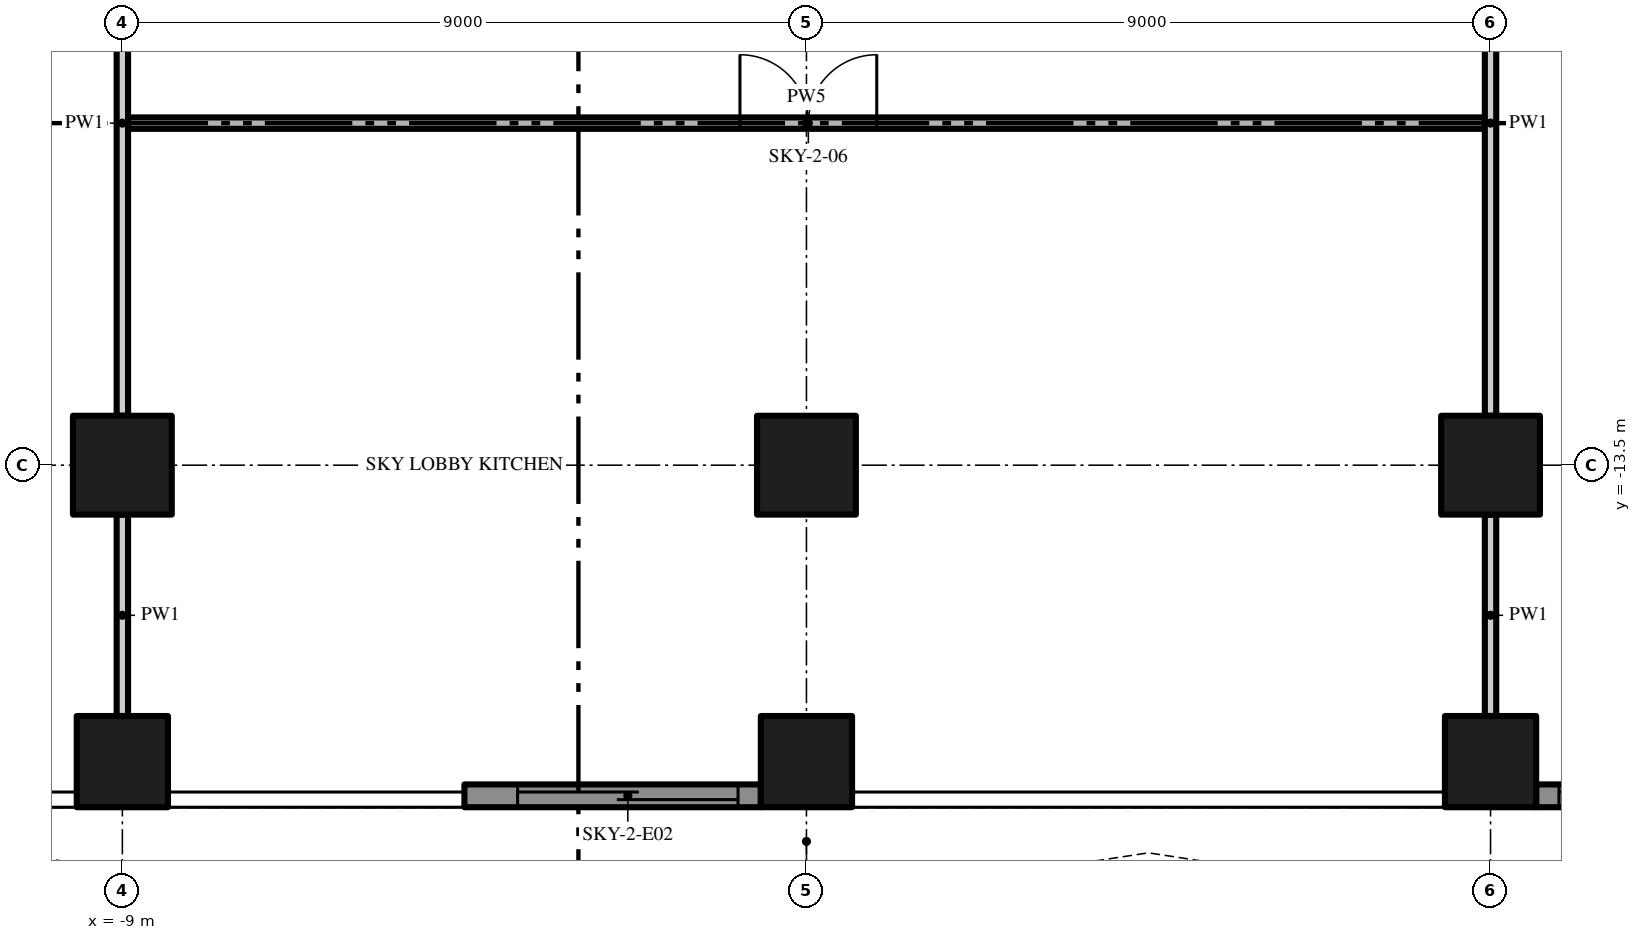
"""IFC4 building model, lengths in metres.
Left out: names, types, materials, properties, quantities, classifications, styles, units other than length and angle.
Written with IfcOpenShell. Run it as: python <this file> out.ifc"""

import sys

from ifc_helpers import new_model, si_unit, direction, frame, frame_2d, origin, origin_2d, place, context, subcontext, project, spatial, polyline, rectangle, outline, extrude, element, fill, save


model = new_model("IFC4")
c1 = context("Model", 3, precision=1e-05, world=origin(), true_north=direction((0.0, 1.0)))
c2 = subcontext(c1, "Body", "Model", "MODEL_VIEW")
j1 = project(units=[si_unit("LENGTHUNIT", "METRE"), si_unit("PLANEANGLEUNIT", "RADIAN")], contexts=[c1])
p1 = place(None, origin())
s1 = spatial("IfcSite", under=j1, at=p1, CompositionType="ELEMENT")
p2 = place(p1, origin())
s2 = spatial("IfcBuilding", under=s1, at=p2, CompositionType="ELEMENT")
p3 = place(p2, frame((0.0, 0.0, 120.0)))
s3 = spatial("IfcBuildingStorey", under=s2, at=p3, CompositionType="ELEMENT", Elevation=120.0)
p4 = place(p3, frame((-9.0, -13.5, 0.0), z_axis=(0.0, 0.0, 1.0), x_axis=(1.0, 0.0, 0.0)))
e1 = element("IfcColumn", 1, at=p4, inside=s3, PredefinedType="COLUMN", context=c2, shape_type="SweptSolid", body=[
    extrude(rectangle(XDim=1.3, YDim=1.3, at=origin_2d()), origin(), (0.0, 0.0, 1.0), 4.7),
])
p5 = place(p3, frame((-9.0, -17.4, 0.0), z_axis=(0.0, 0.0, 1.0), x_axis=(1.0, 0.0, 0.0)))
e2 = element("IfcColumn", 2, at=p5, inside=s3, PredefinedType="COLUMN", context=c2, shape_type="SweptSolid", body=[
    extrude(rectangle(XDim=1.2, YDim=1.2, at=origin_2d()), origin(), (0.0, 0.0, 1.0), 4.7),
])
p6 = place(p3, frame((0.0, -13.5, 0.0), z_axis=(0.0, 0.0, 1.0), x_axis=(1.0, 0.0, 0.0)))
e3 = element("IfcColumn", 3, at=p6, inside=s3, PredefinedType="COLUMN", context=c2, shape_type="SweptSolid", body=[
    extrude(rectangle(XDim=1.3, YDim=1.3, at=origin_2d()), origin(), (0.0, 0.0, 1.0), 4.7),
])
p7 = place(p3, frame((0.0, -17.4, 0.0), z_axis=(0.0, 0.0, 1.0), x_axis=(1.0, 0.0, 0.0)))
e4 = element("IfcColumn", 4, at=p7, inside=s3, PredefinedType="COLUMN", context=c2, shape_type="SweptSolid", body=[
    extrude(rectangle(XDim=1.2, YDim=1.2, at=origin_2d()), origin(), (0.0, 0.0, 1.0), 4.7),
])
p8 = place(p3, frame((9.0, -13.5, 0.0), z_axis=(0.0, 0.0, 1.0), x_axis=(1.0, 0.0, 0.0)))
e5 = element("IfcColumn", 5, at=p8, inside=s3, PredefinedType="COLUMN", context=c2, shape_type="SweptSolid", body=[
    extrude(rectangle(XDim=1.3, YDim=1.3, at=origin_2d()), origin(), (0.0, 0.0, 1.0), 4.7),
])
p9 = place(p3, frame((9.0, -17.4, 0.0), z_axis=(0.0, 0.0, 1.0), x_axis=(1.0, 0.0, 0.0)))
e6 = element("IfcColumn", 6, at=p9, inside=s3, PredefinedType="COLUMN", context=c2, shape_type="SweptSolid", body=[
    extrude(rectangle(XDim=1.2, YDim=1.2, at=origin_2d()), origin(), (0.0, 0.0, 1.0), 4.7),
])
p10 = place(p3, frame((-0.6, -17.85, 0.0), z_axis=(0.0, 0.0, 1.0), x_axis=(-1.0, 0.0, 0.0)))
e7 = element("IfcWall", 7, at=p10, inside=s3, PredefinedType="SOLIDWALL", context=c2, shape_type="SweptSolid", body=[
    extrude(rectangle(XDim=3.9, YDim=0.3, at=frame_2d((1.95, 0.0))), origin(), (0.0, 0.0, 1.0), 4.7),
])
p11 = place(p10, frame((0.3, 0.0, 0.0)))
e8 = element("IfcOpeningElement", 8, at=p11, cuts=e7, PredefinedType="OPENING", context=c2, shape_type="SweptSolid", body=[
    extrude(rectangle(XDim=2.9, YDim=2.4, at=frame_2d((1.45, 1.2))), frame((0.0, 0.16, 0.0), z_axis=(0.0, -1.0, 0.0), x_axis=(1.0, 0.0, 0.0)), (0.0, 0.0, 1.0), 0.32),
])
p12 = place(p3, frame((13.5, -17.85, 0.0), z_axis=(0.0, 0.0, 1.0), x_axis=(-1.0, 0.0, 0.0)))
e9 = element("IfcWall", 9, at=p12, inside=s3, PredefinedType="SOLIDWALL", context=c2, shape_type="SweptSolid", body=[
    extrude(rectangle(XDim=3.9, YDim=0.3, at=frame_2d((1.95, 0.0))), origin(), (0.0, 0.0, 1.0), 4.7),
])
p13 = place(p12, frame((0.7, 0.0, 0.0)))
e10 = element("IfcOpeningElement", 10, at=p13, cuts=e9, PredefinedType="OPENING", context=c2, shape_type="SweptSolid", body=[
    extrude(rectangle(XDim=2.9, YDim=2.4, at=frame_2d((1.45, 1.2))), frame((0.0, 0.16, 0.0), z_axis=(0.0, -1.0, 0.0), x_axis=(1.0, 0.0, 0.0)), (0.0, 0.0, 1.0), 0.32),
])
p14 = place(p3, origin())
e11 = element("IfcWall", 11, at=p14, inside=s3, PredefinedType="USERDEFINED", context=c2, shape_type="SweptSolid", body=[
    extrude(outline(polyline([(-18.0, -21.0), (-16.5, -20.771), (-15.0, -20.171), (-13.5, -19.429), (-12.0, -18.829), (-10.5, -18.6), (-9.0, -18.829), (-7.5, -19.429), (-6.0, -20.171), (-4.5, -20.771), (-3.0, -21.0), (-1.5, -20.771), (0.0, -20.171), (1.5, -19.429), (3.0, -18.829), (4.5, -18.6), (6.0, -18.829), (7.5, -19.429), (9.0, -20.171), (10.5, -20.771), (12.0, -21.0), (13.5, -20.771), (15.0, -20.171), (16.5, -19.429), (18.0, -18.829), (17.907, -18.597), (16.398, -19.201), (14.898, -19.942), (13.434, -20.528), (12.0, -20.747), (10.566, -20.528), (9.102, -19.942), (7.602, -19.201), (6.066, -18.586), (4.5, -18.347), (2.934, -18.586), (1.398, -19.201), (-0.102, -19.942), (-1.566, -20.528), (-3.0, -20.747), (-4.434, -20.528), (-5.898, -19.942), (-7.398, -19.201), (-8.934, -18.586), (-10.5, -18.347), (-12.066, -18.586), (-13.602, -19.201), (-15.102, -19.942), (-16.566, -20.528), (-18.038, -20.753), (-18.0, -21.0)])), origin(), (0.0, 0.0, 1.0), 0.9),
])
p15 = place(p3, frame((-8.925, -9.0, 0.0), z_axis=(0.0, 0.0, 1.0), x_axis=(1.0, 0.0, 0.0)))
e12 = element("IfcWall", 12, at=p15, inside=s3, PredefinedType="PARTITIONING", context=c2, shape_type="SweptSolid", body=[
    extrude(rectangle(XDim=17.85, YDim=0.15, at=frame_2d((8.925, 0.0))), origin(), (0.0, 0.0, 1.0), 4.7),
])
p16 = place(p15, frame((8.05, 0.0, 0.0)))
e13 = element("IfcOpeningElement", 13, at=p16, cuts=e12, PredefinedType="OPENING", context=c2, shape_type="SweptSolid", body=[
    extrude(rectangle(XDim=1.8, YDim=2.4, at=frame_2d((0.9, 1.2))), frame((0.0, 0.085, 0.0), z_axis=(0.0, -1.0, 0.0), x_axis=(1.0, 0.0, 0.0)), (0.0, 0.0, 1.0), 0.17),
])
p17 = place(p3, frame((-9.0, -16.8, 0.0), z_axis=(0.0, 0.0, 1.0), x_axis=(0.0, 1.0, 0.0)))
e14 = element("IfcWall", 14, at=p17, inside=s3, PredefinedType="PARTITIONING", context=c2, shape_type="SweptSolid", body=[
    extrude(rectangle(XDim=2.65, YDim=0.15, at=frame_2d((1.325, 0.0))), origin(), (0.0, 0.0, 1.0), 4.7),
])
p18 = place(p3, frame((-9.0, -12.85, 0.0), z_axis=(0.0, 0.0, 1.0), x_axis=(0.0, 1.0, 0.0)))
e15 = element("IfcWall", 15, at=p18, inside=s3, PredefinedType="PARTITIONING", context=c2, shape_type="SweptSolid", body=[
    extrude(rectangle(XDim=7.7, YDim=0.15, at=frame_2d((3.85, 0.0))), origin(), (0.0, 0.0, 1.0), 4.7),
])
p19 = place(p3, frame((9.0, -16.8, 0.0), z_axis=(0.0, 0.0, 1.0), x_axis=(0.0, 1.0, 0.0)))
e16 = element("IfcWall", 16, at=p19, inside=s3, PredefinedType="PARTITIONING", context=c2, shape_type="SweptSolid", body=[
    extrude(rectangle(XDim=2.65, YDim=0.15, at=frame_2d((1.325, 0.0))), origin(), (0.0, 0.0, 1.0), 4.7),
])
p20 = place(p3, frame((9.0, -12.85, 0.0), z_axis=(0.0, 0.0, 1.0), x_axis=(0.0, 1.0, 0.0)))
e17 = element("IfcWall", 17, at=p20, inside=s3, PredefinedType="PARTITIONING", context=c2, shape_type="SweptSolid", body=[
    extrude(rectangle(XDim=7.7, YDim=0.15, at=frame_2d((3.85, 0.0))), origin(), (0.0, 0.0, 1.0), 4.7),
])
p21 = place(p11, origin())
e18 = element("IfcDoor", 18, at=p21, inside=s3, OperationType="SINGLE_SWING_LEFT", PredefinedType="DOOR", context=c2, shape_type="SweptSolid", body=[
    extrude(rectangle(XDim=2.9, YDim=2.4, at=frame_2d((1.45, 1.2))), frame((0.0, 0.025, 0.0), z_axis=(0.0, -1.0, 0.0), x_axis=(1.0, 0.0, 0.0)), (0.0, 0.0, 1.0), 0.05),
])
fill(e8, e18)
p22 = place(p13, origin())
e19 = element("IfcDoor", 19, at=p22, inside=s3, OperationType="SINGLE_SWING_LEFT", PredefinedType="DOOR", context=c2, shape_type="SweptSolid", body=[
    extrude(rectangle(XDim=2.9, YDim=2.4, at=frame_2d((1.45, 1.2))), frame((0.0, 0.025, 0.0), z_axis=(0.0, -1.0, 0.0), x_axis=(1.0, 0.0, 0.0)), (0.0, 0.0, 1.0), 0.05),
])
fill(e10, e19)
p23 = place(p16, origin())
e20 = element("IfcDoor", 20, at=p23, inside=s3, OperationType="DOUBLE_DOOR_SINGLE_SWING", PredefinedType="DOOR", context=c2, shape_type="SweptSolid", body=[
    extrude(rectangle(XDim=1.8, YDim=2.4, at=frame_2d((0.9, 1.2))), frame((0.0, 0.025, 0.0), z_axis=(0.0, -1.0, 0.0), x_axis=(1.0, 0.0, 0.0)), (0.0, 0.0, 1.0), 0.05),
])
fill(e13, e20)
save(model, sys.argv[1])
